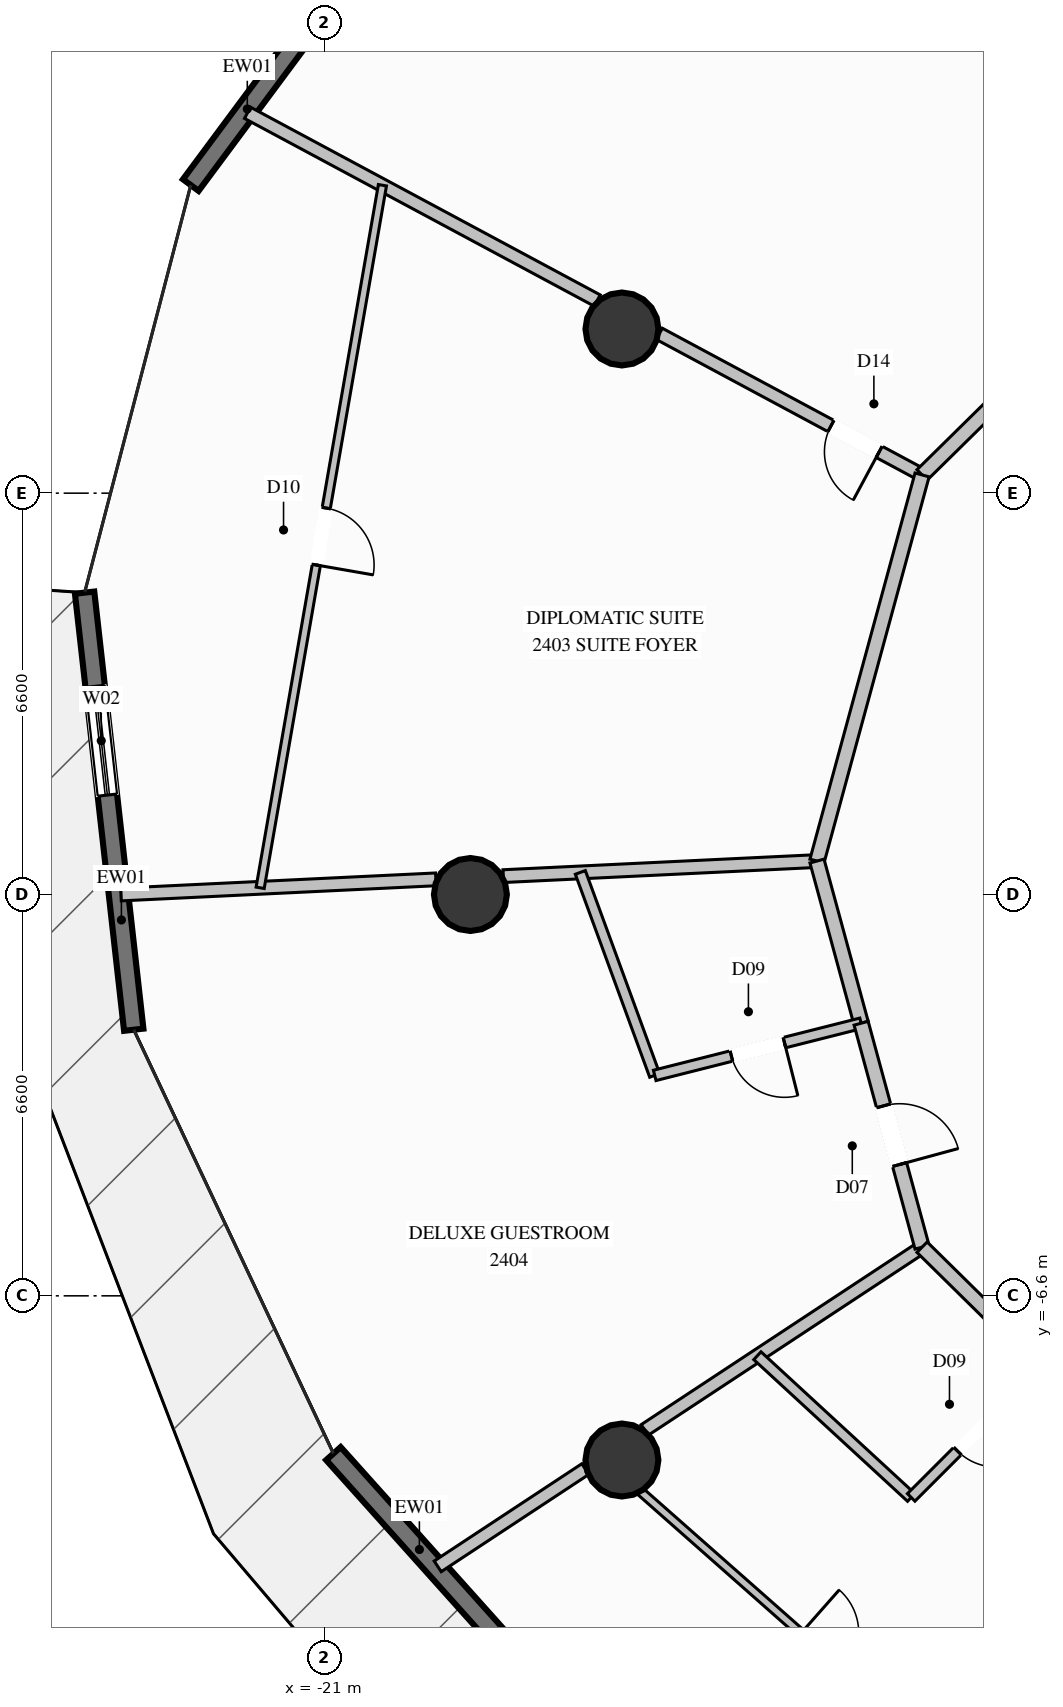
"""IFC4 building model, lengths in metres.
Left out: names, types, materials, properties, quantities, classifications, styles, units other than length and angle.
Written with IfcOpenShell. Run it as: python <this file> out.ifc"""

import sys

from ifc_helpers import new_model, si_unit, direction, frame, frame_2d, origin, origin_2d, place, context, subcontext, project, spatial, rectangle, circle, extrude, element, fill, save


model = new_model("IFC4")
c1 = context("Model", 3, precision=1e-05, world=origin(), true_north=direction((0.0, 1.0)))
c2 = subcontext(c1, "Body", "Model", "MODEL_VIEW")
j1 = project(units=[si_unit("LENGTHUNIT", "METRE"), si_unit("PLANEANGLEUNIT", "RADIAN")], contexts=[c1])
p1 = place(None, origin())
s1 = spatial("IfcSite", under=j1, at=p1, CompositionType="ELEMENT")
p2 = place(p1, origin())
s2 = spatial("IfcBuilding", under=s1, at=p2, CompositionType="ELEMENT")
p3 = place(p2, frame((0.0, 0.0, 89.6)))
s3 = spatial("IfcBuildingStorey", under=s2, at=p3, CompositionType="ELEMENT", Elevation=89.6)
for number, where, z_axis, x_axis in (
    (1, (-16.108, 9.3, 0.0), (0.0, 0.0, 1.0), (1.0, 0.0, 0.0)),
    (2, (-18.6, 0.0, 0.0), (0.0, 0.0, 1.0), (1.0, 0.0, 0.0)),
    (3, (-16.108, -9.3, 0.0), (0.0, 0.0, 1.0), (1.0, 0.0, 0.0)),
):
    element("IfcColumn", number, at=place(p3, frame(where, z_axis=z_axis, x_axis=x_axis)), inside=s3, PredefinedType="COLUMN", context=c2, shape_type="SweptSolid", body=[
        extrude(circle(Radius=0.6, at=origin_2d()), origin(), (0.0, 0.0, 1.0), 3.6),
    ])
p4 = place(p3, frame((-23.199, 11.666, 0.0), z_axis=(0.0, 0.0, 1.0), x_axis=(0.596191587438, 0.80284219562, 0.0)))
e4 = element("IfcWall", 4, at=p4, inside=s3, PredefinedType="SOLIDWALL", context=c2, shape_type="SweptSolid", body=[
    extrude(rectangle(XDim=6.926, YDim=0.32, at=frame_2d((3.463, 0.0))), origin(), (0.0, 0.0, 1.0), 3.2),
])
p5 = place(p4, frame((3.368, 0.0, 0.35)))
e5 = element("IfcOpeningElement", 5, at=p5, cuts=e4, PredefinedType="OPENING", context=c2, shape_type="SweptSolid", body=[
    extrude(rectangle(XDim=1.8, YDim=2.6, at=frame_2d((0.9, 1.3))), frame((0.0, 0.17, 0.0), z_axis=(0.0, -1.0, 0.0), x_axis=(1.0, 0.0, 0.0)), (0.0, 0.0, 1.0), 0.34),
])
p6 = place(p3, frame((-24.137, -2.224, 0.0), z_axis=(0.0, 0.0, 1.0), x_axis=(-0.111716865036, 0.99374007772, 0.0)))
e6 = element("IfcWall", 6, at=p6, inside=s3, PredefinedType="SOLIDWALL", context=c2, shape_type="SweptSolid", body=[
    extrude(rectangle(XDim=7.233, YDim=0.32, at=frame_2d((3.617, 0.0))), origin(), (0.0, 0.0, 1.0), 3.2),
])
p7 = place(p6, frame((3.883, 0.0, 0.35)))
e7 = element("IfcOpeningElement", 7, at=p7, cuts=e6, PredefinedType="OPENING", context=c2, shape_type="SweptSolid", body=[
    extrude(rectangle(XDim=1.8, YDim=2.6, at=frame_2d((0.9, 1.3))), frame((0.0, 0.17, 0.0), z_axis=(0.0, -1.0, 0.0), x_axis=(1.0, 0.0, 0.0)), (0.0, 0.0, 1.0), 0.34),
])
p8 = place(p3, frame((-15.415, -15.264, 0.0), z_axis=(0.0, 0.0, 1.0), x_axis=(-0.667278098427, 0.744808659563, 0.0)))
e8 = element("IfcWall", 8, at=p8, inside=s3, PredefinedType="SOLIDWALL", context=c2, shape_type="SweptSolid", body=[
    extrude(rectangle(XDim=8.149, YDim=0.32, at=frame_2d((4.075, 0.0))), origin(), (0.0, 0.0, 1.0), 3.2),
])
p9 = place(p8, frame((1.862, 0.0, 0.35)))
e9 = element("IfcOpeningElement", 9, at=p9, cuts=e8, PredefinedType="OPENING", context=c2, shape_type="SweptSolid", body=[
    extrude(rectangle(XDim=1.8, YDim=2.6, at=frame_2d((0.9, 1.3))), frame((0.0, 0.17, 0.0), z_axis=(0.0, -1.0, 0.0), x_axis=(1.0, 0.0, 0.0)), (0.0, 0.0, 1.0), 0.34),
])
p10 = place(p3, frame((-11.172, 6.9, 0.0), z_axis=(0.0, 0.0, 1.0), x_axis=(-0.881025167938, 0.473069396029, 0.0)))
e10 = element("IfcWall", 10, at=p10, inside=s3, PredefinedType="PARTITIONING", context=c2, shape_type="SweptSolid", body=[
    extrude(rectangle(XDim=4.904, YDim=0.21, at=frame_2d((2.452, 0.0))), origin(), (0.0, 0.0, 1.0), 2.067),
])
p11 = place(p10, frame((0.801, 0.0, 0.0)))
e11 = element("IfcOpeningElement", 11, at=p11, cuts=e10, PredefinedType="OPENING", context=c2, shape_type="SweptSolid", body=[
    extrude(rectangle(XDim=0.9, YDim=2.02, at=frame_2d((0.45, 1.01))), frame((0.0, 0.115, 0.0), z_axis=(0.0, -1.0, 0.0), x_axis=(1.0, 0.0, 0.0)), (0.0, 0.0, 1.0), 0.23),
])
p12 = place(p3, frame((-16.515, 9.768, 0.0), z_axis=(0.0, 0.0, 1.0), x_axis=(-0.881103250106, 0.472923950178, 0.0)))
e12 = element("IfcWall", 12, at=p12, inside=s3, PredefinedType="PARTITIONING", context=c2, shape_type="SweptSolid", body=[
    extrude(rectangle(XDim=6.527, YDim=0.21, at=frame_2d((3.264, 0.0))), origin(), (0.0, 0.0, 1.0), 3.2),
])
p13 = place(p3, frame((-12.9, 0.55, 0.0), z_axis=(0.0, 0.0, 1.0), x_axis=(-0.998846217128, -0.048023270708, 0.0)))
e13 = element("IfcWall", 13, at=p13, inside=s3, PredefinedType="PARTITIONING", context=c2, shape_type="SweptSolid", body=[
    extrude(rectangle(XDim=5.165, YDim=0.21, at=frame_2d((2.583, 0.0))), origin(), (0.0, 0.0, 1.0), 2.067),
])
p14 = place(p3, frame((-19.168, 0.249, 0.0), z_axis=(0.0, 0.0, 1.0), x_axis=(-0.998845978554, -0.048028232599, 0.0)))
e14 = element("IfcWall", 14, at=p14, inside=s3, PredefinedType="PARTITIONING", context=c2, shape_type="SweptSolid", body=[
    extrude(rectangle(XDim=5.185, YDim=0.21, at=frame_2d((2.593, 0.0))), origin(), (0.0, 0.0, 1.0), 3.2),
])
p15 = place(p3, frame((-11.172, -5.8, 0.0), z_axis=(0.0, 0.0, 1.0), x_axis=(-0.835022135292, -0.550216351604, 0.0)))
e15 = element("IfcWall", 15, at=p15, inside=s3, PredefinedType="PARTITIONING", context=c2, shape_type="SweptSolid", body=[
    extrude(rectangle(XDim=5.463, YDim=0.21, at=frame_2d((2.731, 0.0))), origin(), (0.0, 0.0, 1.0), 2.067),
])
p16 = place(p3, frame((-16.71, -9.449, 0.0), z_axis=(0.0, 0.0, 1.0), x_axis=(-0.834983630618, -0.550274782813, 0.0)))
e16 = element("IfcWall", 16, at=p16, inside=s3, PredefinedType="PARTITIONING", context=c2, shape_type="SweptSolid", body=[
    extrude(rectangle(XDim=2.908, YDim=0.21, at=frame_2d((1.454, 0.0))), origin(), (0.0, 0.0, 1.0), 3.2),
])
p17 = place(p3, frame((-6.45, 11.549, 0.0), z_axis=(0.0, 0.0, 1.0), x_axis=(-0.712593171801, -0.701577487882, 0.0)))
e17 = element("IfcWall", 17, at=p17, inside=s3, PredefinedType="PARTITIONING", context=c2, shape_type="SweptSolid", body=[
    extrude(rectangle(XDim=6.627, YDim=0.24, at=frame_2d((3.313, 0.0))), origin(), (0.0, 0.0, 1.0), 3.2),
])
p18 = place(p3, frame((-11.172, 6.9, 0.0), z_axis=(0.0, 0.0, 1.0), x_axis=(-0.262552308576, -0.96491776088, 0.0)))
e18 = element("IfcWall", 18, at=p18, inside=s3, PredefinedType="PARTITIONING", context=c2, shape_type="SweptSolid", body=[
    extrude(rectangle(XDim=6.581, YDim=0.24, at=frame_2d((3.291, 0.0))), origin(), (0.0, 0.0, 1.0), 3.2),
])
p19 = place(p3, frame((-20.047, 11.664, 0.0), z_axis=(0.0, 0.0, 1.0), x_axis=(-0.171473832305, -0.985188674739, 0.0)))
e19 = element("IfcWall", 19, at=p19, inside=s3, PredefinedType="PARTITIONING", context=c2, shape_type="SweptSolid", body=[
    extrude(rectangle(XDim=11.728, YDim=0.135, at=frame_2d((5.864, 0.0))), origin(), (0.0, 0.0, 1.0), 3.2),
])
p20 = place(p19, frame((5.389, 0.0, 0.0)))
e20 = element("IfcOpeningElement", 20, at=p20, cuts=e19, PredefinedType="OPENING", context=c2, shape_type="SweptSolid", body=[
    extrude(rectangle(XDim=0.95, YDim=2.1, at=frame_2d((0.475, 1.05))), frame((0.0, 0.078, 0.0), z_axis=(0.0, -1.0, 0.0), x_axis=(1.0, 0.0, 0.0)), (0.0, 0.0, 1.0), 0.155),
])
p21 = place(p3, frame((-12.9, 0.55, 0.0), z_axis=(0.0, 0.0, 1.0), x_axis=(0.262601663623, -0.964904330109, 0.0)))
e21 = element("IfcWall", 21, at=p21, inside=s3, PredefinedType="PARTITIONING", context=c2, shape_type="SweptSolid", body=[
    extrude(rectangle(XDim=2.764, YDim=0.24, at=frame_2d((1.382, 0.0))), origin(), (0.0, 0.0, 1.0), 3.2),
])
p22 = place(p3, frame((-16.792, 0.363, 0.0), z_axis=(0.0, 0.0, 1.0), x_axis=(0.343986263083, -0.938974680601, 0.0)))
e22 = element("IfcWall", 22, at=p22, inside=s3, PredefinedType="PLUMBINGWALL", context=c2, shape_type="SweptSolid", body=[
    extrude(rectangle(XDim=3.555, YDim=0.175, at=frame_2d((1.778, 0.0))), origin(), (0.0, 0.0, 1.0), 3.2),
])
p23 = place(p3, frame((-12.174, -2.117, 0.0), z_axis=(0.0, 0.0, 1.0), x_axis=(-0.969507641887, -0.24506107876, 0.0)))
e23 = element("IfcWall", 23, at=p23, inside=s3, PredefinedType="PLUMBINGWALL", context=c2, shape_type="SweptSolid", body=[
    extrude(rectangle(XDim=3.502, YDim=0.175, at=frame_2d((1.751, 0.0))), origin(), (0.0, 0.0, 1.0), 3.2),
])
p24 = place(p23, frame((1.301, 0.0, 0.0)))
e24 = element("IfcOpeningElement", 24, at=p24, cuts=e23, PredefinedType="OPENING", context=c2, shape_type="SweptSolid", body=[
    extrude(rectangle(XDim=0.9, YDim=2.1, at=frame_2d((0.45, 1.05))), frame((0.0, 0.098, 0.0), z_axis=(0.0, -1.0, 0.0), x_axis=(1.0, 0.0, 0.0)), (0.0, 0.0, 1.0), 0.195),
])
p25 = place(p3, frame((-12.174, -2.117, 0.0), z_axis=(0.0, 0.0, 1.0), x_axis=(0.262500363951, -0.964931893413, 0.0)))
e25 = element("IfcWall", 25, at=p25, inside=s3, PredefinedType="PARTITIONING", context=c2, shape_type="SweptSolid", body=[
    extrude(rectangle(XDim=3.817, YDim=0.24, at=frame_2d((1.908, 0.0))), origin(), (0.0, 0.0, 1.0), 3.2),
])
p26 = place(p25, frame((1.408, 0.0, 0.0)))
e26 = element("IfcOpeningElement", 26, at=p26, cuts=e25, PredefinedType="OPENING", context=c2, shape_type="SweptSolid", body=[
    extrude(rectangle(XDim=1.0, YDim=2.2, at=frame_2d((0.5, 1.1))), frame((0.0, 0.13, 0.0), z_axis=(0.0, -1.0, 0.0), x_axis=(1.0, 0.0, 0.0)), (0.0, 0.0, 1.0), 0.26),
])
p27 = place(p3, frame((-11.172, -5.8, 0.0), z_axis=(0.0, 0.0, 1.0), x_axis=(0.712524314294, -0.701647419677, 0.0)))
e27 = element("IfcWall", 27, at=p27, inside=s3, PredefinedType="PARTITIONING", context=c2, shape_type="SweptSolid", body=[
    extrude(rectangle(XDim=2.783, YDim=0.24, at=frame_2d((1.392, 0.0))), origin(), (0.0, 0.0, 1.0), 3.2),
])
p28 = place(p3, frame((-13.88, -7.585, 0.0), z_axis=(0.0, 0.0, 1.0), x_axis=(0.735412881507, -0.677619283752, 0.0)))
e28 = element("IfcWall", 28, at=p28, inside=s3, PredefinedType="PLUMBINGWALL", context=c2, shape_type="SweptSolid", body=[
    extrude(rectangle(XDim=3.439, YDim=0.175, at=frame_2d((1.719, 0.0))), origin(), (0.0, 0.0, 1.0), 3.2),
])
p29 = place(p3, frame((-9.189, -7.753, 0.0), z_axis=(0.0, 0.0, 1.0), x_axis=(-0.707106781187, -0.707106781187, 0.0)))
e29 = element("IfcWall", 29, at=p29, inside=s3, PredefinedType="PLUMBINGWALL", context=c2, shape_type="SweptSolid", body=[
    extrude(rectangle(XDim=3.058, YDim=0.175, at=frame_2d((1.529, 0.0))), origin(), (0.0, 0.0, 1.0), 3.2),
])
p30 = place(p29, frame((1.079, 0.0, 0.0)))
e30 = element("IfcOpeningElement", 30, at=p30, cuts=e29, PredefinedType="OPENING", context=c2, shape_type="SweptSolid", body=[
    extrude(rectangle(XDim=0.9, YDim=2.1, at=frame_2d((0.45, 1.05))), frame((0.0, 0.098, 0.0), z_axis=(0.0, -1.0, 0.0), x_axis=(1.0, 0.0, 0.0)), (0.0, 0.0, 1.0), 0.195),
])
p31 = place(p3, frame((-16.43, -9.264, 0.0), z_axis=(0.0, 0.0, 1.0), x_axis=(0.749748657473, -0.661722714297, 0.0)))
e31 = element("IfcWall", 31, at=p31, inside=s3, PredefinedType="PARTITIONING", context=c2, shape_type="SweptSolid", body=[
    extrude(rectangle(XDim=9.666, YDim=0.135, at=frame_2d((4.833, 0.0))), origin(), (0.0, 0.0, 1.0), 2.653),
])
p32 = place(p31, frame((4.358, 0.0, 0.0)))
e32 = element("IfcOpeningElement", 32, at=p32, cuts=e31, PredefinedType="OPENING", context=c2, shape_type="SweptSolid", body=[
    extrude(rectangle(XDim=0.95, YDim=2.1, at=frame_2d((0.475, 1.05))), frame((0.0, 0.078, 0.0), z_axis=(0.0, -1.0, 0.0), x_axis=(1.0, 0.0, 0.0)), (0.0, 0.0, 1.0), 0.155),
])
p33 = place(p7, origin())
e33 = element("IfcWindow", 33, at=p33, inside=s3, PartitioningType="SINGLE_PANEL", PredefinedType="WINDOW", context=c2, shape_type="SweptSolid", body=[
    extrude(rectangle(XDim=1.8, YDim=2.6, at=frame_2d((0.9, 1.3))), frame((0.0, 0.03, 0.0), z_axis=(0.0, -1.0, 0.0), x_axis=(1.0, 0.0, 0.0)), (0.0, 0.0, 1.0), 0.06),
])
fill(e7, e33)
p34 = place(p11, origin())
e34 = element("IfcDoor", 34, at=p34, inside=s3, OperationType="SINGLE_SWING_LEFT", PredefinedType="DOOR", context=c2, shape_type="SweptSolid", body=[
    extrude(rectangle(XDim=0.9, YDim=2.02, at=frame_2d((0.45, 1.01))), frame((0.0, 0.025, 0.0), z_axis=(0.0, -1.0, 0.0), x_axis=(1.0, 0.0, 0.0)), (0.0, 0.0, 1.0), 0.05),
])
fill(e11, e34)
p35 = place(p20, origin())
e35 = element("IfcDoor", 35, at=p35, inside=s3, OperationType="SINGLE_SWING_RIGHT", PredefinedType="DOOR", context=c2, shape_type="SweptSolid", body=[
    extrude(rectangle(XDim=0.95, YDim=2.1, at=frame_2d((0.475, 1.05))), frame((0.0, 0.025, 0.0), z_axis=(0.0, -1.0, 0.0), x_axis=(1.0, 0.0, 0.0)), (0.0, 0.0, 1.0), 0.05),
])
fill(e20, e35)
p36 = place(p24, origin())
e36 = element("IfcDoor", 36, at=p36, inside=s3, OperationType="SINGLE_SWING_LEFT", PredefinedType="DOOR", context=c2, shape_type="SweptSolid", body=[
    extrude(rectangle(XDim=0.9, YDim=2.1, at=frame_2d((0.45, 1.05))), frame((0.0, 0.025, 0.0), z_axis=(0.0, -1.0, 0.0), x_axis=(1.0, 0.0, 0.0)), (0.0, 0.0, 1.0), 0.05),
])
fill(e24, e36)
p37 = place(p26, origin())
e37 = element("IfcDoor", 37, at=p37, inside=s3, OperationType="SINGLE_SWING_RIGHT", PredefinedType="DOOR", context=c2, shape_type="SweptSolid", body=[
    extrude(rectangle(XDim=1.0, YDim=2.2, at=frame_2d((0.5, 1.1))), frame((0.0, 0.025, 0.0), z_axis=(0.0, -1.0, 0.0), x_axis=(1.0, 0.0, 0.0)), (0.0, 0.0, 1.0), 0.05),
])
fill(e26, e37)
p38 = place(p30, origin())
e38 = element("IfcDoor", 38, at=p38, inside=s3, OperationType="SINGLE_SWING_LEFT", PredefinedType="DOOR", context=c2, shape_type="SweptSolid", body=[
    extrude(rectangle(XDim=0.9, YDim=2.1, at=frame_2d((0.45, 1.05))), frame((0.0, 0.025, 0.0), z_axis=(0.0, -1.0, 0.0), x_axis=(1.0, 0.0, 0.0)), (0.0, 0.0, 1.0), 0.05),
])
fill(e30, e38)
save(model, sys.argv[1])
